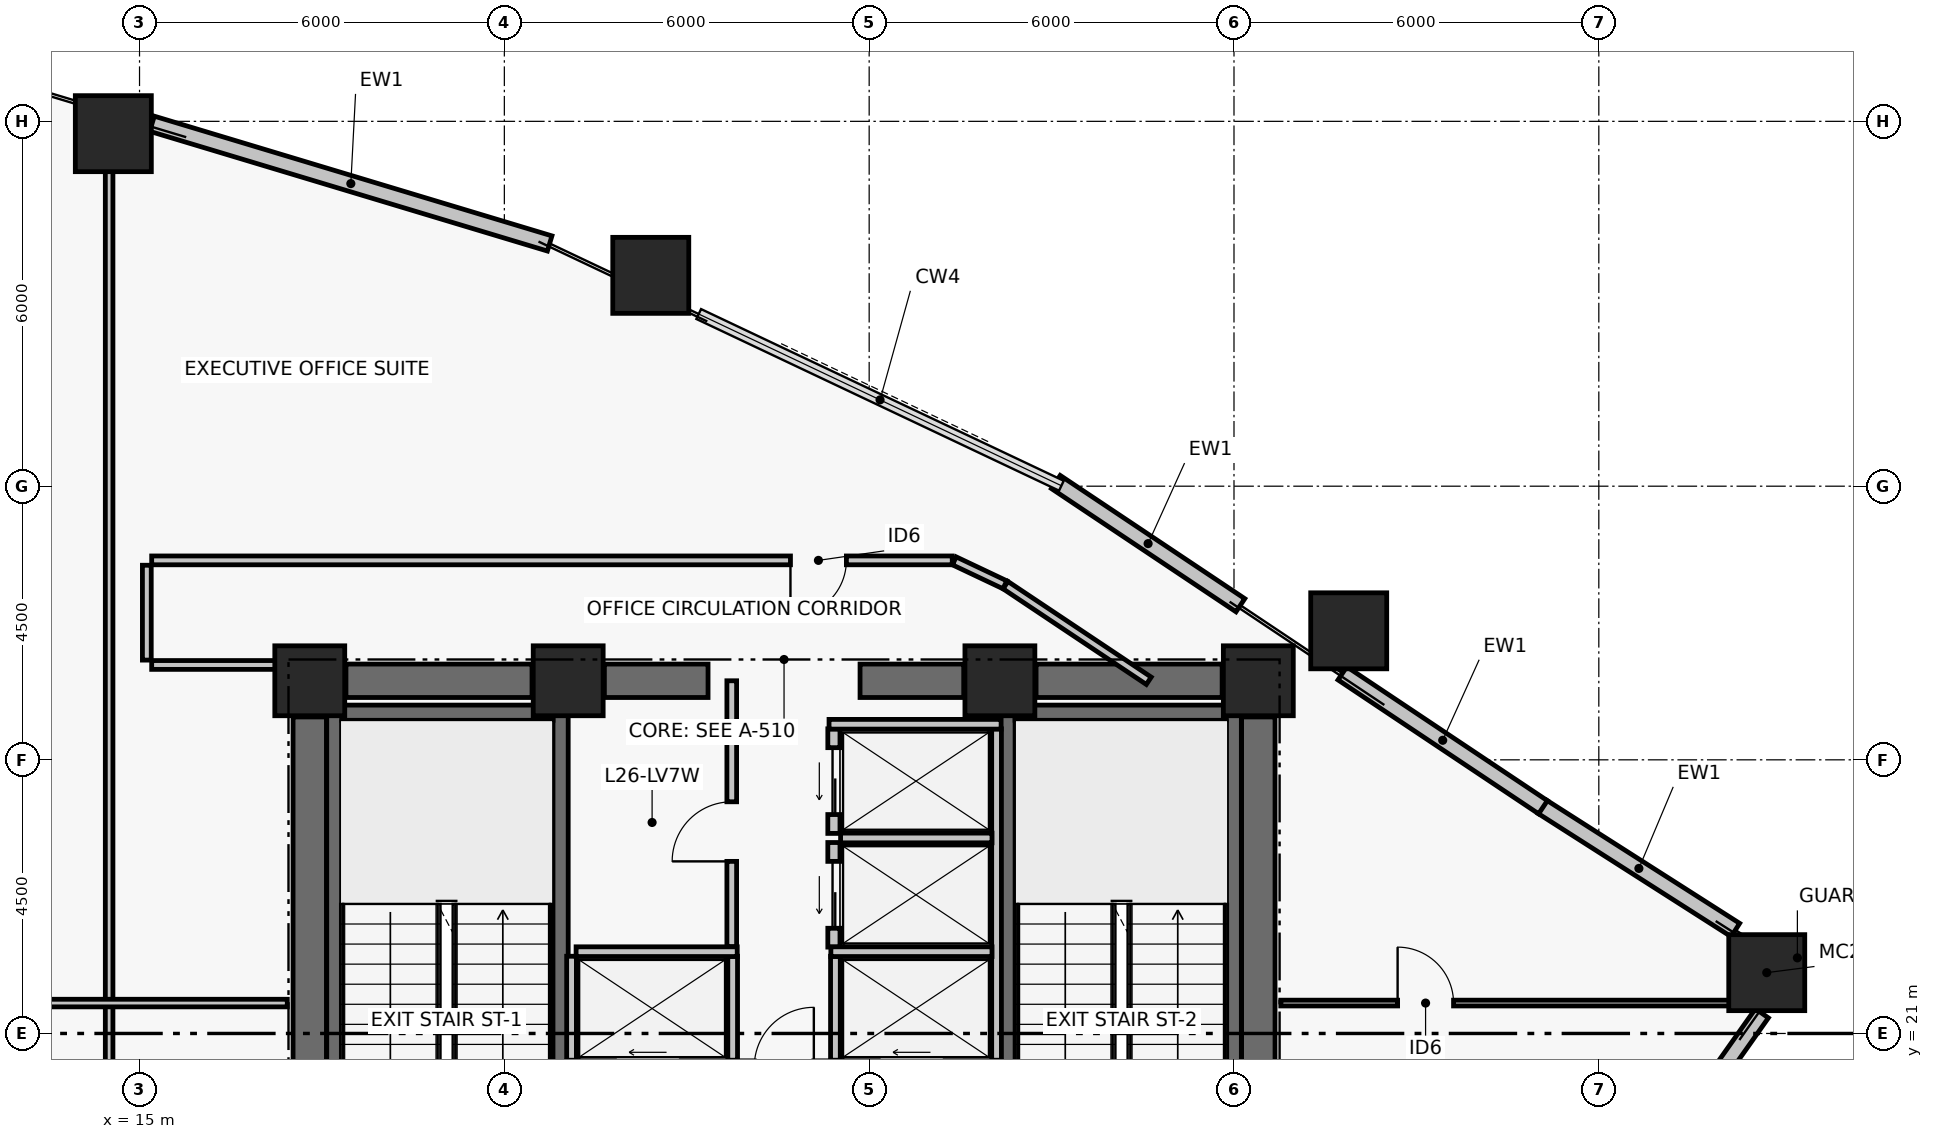
"""IFC4 building model, lengths in metres.
Left out: names, types, materials, properties, quantities, classifications, styles, units other than length and angle.
Written with IfcOpenShell. Run it as: python <this file> out.ifc"""

import sys

from ifc_helpers import new_model, si_unit, direction, frame, frame_2d, origin, origin_2d, place, context, subcontext, project, spatial, rectangle, hollow_rectangle, extrude, element, fill, save


model = new_model("IFC4")
c1 = context("Model", 3, precision=1e-05, world=origin(), true_north=direction((0.0, 1.0)))
c2 = subcontext(c1, "Body", "Model", "MODEL_VIEW")
j1 = project(units=[si_unit("LENGTHUNIT", "METRE"), si_unit("PLANEANGLEUNIT", "RADIAN")], contexts=[c1])
p1 = place(None, origin())
s1 = spatial("IfcSite", under=j1, at=p1, CompositionType="ELEMENT")
p2 = place(p1, origin())
s2 = spatial("IfcBuilding", under=s1, at=p2, CompositionType="ELEMENT")
p3 = place(p2, frame((0.0, 0.0, 107.7)))
s3 = spatial("IfcBuildingStorey", under=s2, at=p3, CompositionType="ELEMENT", Elevation=107.7)
for number, where, z_axis, x_axis in (
    (1, (17.8, 26.8, 0.0), (0.0, 0.0, 1.0), (1.0, 0.0, 0.0)),
    (2, (22.05, 26.8, 0.0), (0.0, 0.0, 1.0), (1.0, 0.0, 0.0)),
    (3, (29.15, 26.8, 0.0), (0.0, 0.0, 1.0), (1.0, 0.0, 0.0)),
    (4, (33.4, 26.8, 0.0), (0.0, 0.0, 1.0), (1.0, 0.0, 0.0)),
):
    element("IfcColumn", number, at=place(p3, frame(where, z_axis=z_axis, x_axis=x_axis)), inside=s3, PredefinedType="COLUMN", context=c2, shape_type="SweptSolid", body=[
        extrude(rectangle(XDim=1.15, YDim=1.15, at=origin_2d()), origin(), (0.0, 0.0, 1.0), 3.72),
    ])
p4 = place(p3, frame((18.395, 26.8, 0.0), z_axis=(0.0, 0.0, 1.0), x_axis=(1.0, 0.0, 0.0)))
e5 = element("IfcWall", 5, at=p4, inside=s3, PredefinedType="SHEAR", context=c2, shape_type="SweptSolid", body=[
    extrude(rectangle(XDim=3.06, YDim=0.55, at=frame_2d((1.53, 0.0))), origin(), (0.0, 0.0, 1.0), 3.47),
])
p5 = place(p3, frame((22.645, 26.8, 0.0), z_axis=(0.0, 0.0, 1.0), x_axis=(1.0, 0.0, 0.0)))
e6 = element("IfcWall", 6, at=p5, inside=s3, PredefinedType="SHEAR", context=c2, shape_type="SweptSolid", body=[
    extrude(rectangle(XDim=1.705, YDim=0.55, at=frame_2d((0.853, 0.0))), origin(), (0.0, 0.0, 1.0), 3.47),
])
p6 = place(p3, frame((26.85, 26.8, 0.0), z_axis=(0.0, 0.0, 1.0), x_axis=(1.0, 0.0, 0.0)))
e7 = element("IfcWall", 7, at=p6, inside=s3, PredefinedType="SHEAR", context=c2, shape_type="SweptSolid", body=[
    extrude(rectangle(XDim=1.705, YDim=0.55, at=frame_2d((0.853, 0.0))), origin(), (0.0, 0.0, 1.0), 3.47),
])
p7 = place(p3, frame((29.745, 26.8, 0.0), z_axis=(0.0, 0.0, 1.0), x_axis=(1.0, 0.0, 0.0)))
e8 = element("IfcWall", 8, at=p7, inside=s3, PredefinedType="SHEAR", context=c2, shape_type="SweptSolid", body=[
    extrude(rectangle(XDim=3.06, YDim=0.55, at=frame_2d((1.53, 0.0))), origin(), (0.0, 0.0, 1.0), 3.47),
])
for number, where, z_axis, x_axis in (
    (9, (17.8, 17.795, 0.0), (0.0, 0.0, 1.0), (0.0, 1.0, 0.0)),
    (10, (33.4, 17.795, 0.0), (0.0, 0.0, 1.0), (0.0, 1.0, 0.0)),
):
    element("IfcWall", number, at=place(p3, frame(where, z_axis=z_axis, x_axis=x_axis)), inside=s3, PredefinedType="SHEAR", context=c2, shape_type="SweptSolid", body=[
        extrude(rectangle(XDim=8.41, YDim=0.55, at=frame_2d((4.205, 0.0))), origin(), (0.0, 0.0, 1.0), 3.47),
    ])
p8 = place(p3, frame((18.204, 17.6, 0.0), z_axis=(0.0, 0.0, 1.0), x_axis=(0.0, 1.0, 0.0)))
e11 = element("IfcWall", 11, at=p8, inside=s3, PredefinedType="SHEAR", context=c2, shape_type="SweptSolid", body=[
    extrude(rectangle(XDim=8.8, YDim=0.25, at=frame_2d((4.4, 0.0))), origin(), (0.0, 0.0, 1.0), 3.47),
])
p9 = place(p3, frame((21.925, 17.6, 0.0), z_axis=(0.0, 0.0, 1.0), x_axis=(0.0, 1.0, 0.0)))
e12 = element("IfcWall", 12, at=p9, inside=s3, PredefinedType="SHEAR", context=c2, shape_type="SweptSolid", body=[
    extrude(rectangle(XDim=8.8, YDim=0.25, at=frame_2d((4.4, 0.0))), origin(), (0.0, 0.0, 1.0), 3.47),
])
p10 = place(p9, frame((0.35, 0.0, 0.0)))
e13 = element("IfcOpeningElement", 13, at=p10, cuts=e12, PredefinedType="OPENING", context=c2, shape_type="SweptSolid", body=[
    extrude(rectangle(XDim=1.05, YDim=2.08, at=frame_2d((0.525, 1.04))), frame((0.0, 0.135, 0.0), z_axis=(0.0, -1.0, 0.0), x_axis=(1.0, 0.0, 0.0)), (0.0, 0.0, 1.0), 0.27),
])
p11 = place(p3, frame((18.329, 26.275, 0.0), z_axis=(0.0, 0.0, 1.0), x_axis=(1.0, 0.0, 0.0)))
e14 = element("IfcWall", 14, at=p11, inside=s3, PredefinedType="SHEAR", context=c2, shape_type="SweptSolid", body=[
    extrude(rectangle(XDim=3.471, YDim=0.25, at=frame_2d((1.735, 0.0))), origin(), (0.0, 0.0, 1.0), 3.47),
])
p12 = place(p3, frame((29.275, 17.6, 0.0), z_axis=(0.0, 0.0, 1.0), x_axis=(0.0, 1.0, 0.0)))
e15 = element("IfcWall", 15, at=p12, inside=s3, PredefinedType="SHEAR", context=c2, shape_type="SweptSolid", body=[
    extrude(rectangle(XDim=8.8, YDim=0.25, at=frame_2d((4.4, 0.0))), origin(), (0.0, 0.0, 1.0), 3.47),
])
p13 = place(p12, frame((0.35, 0.0, 0.0)))
e16 = element("IfcOpeningElement", 16, at=p13, cuts=e15, PredefinedType="OPENING", context=c2, shape_type="SweptSolid", body=[
    extrude(rectangle(XDim=1.05, YDim=2.08, at=frame_2d((0.525, 1.04))), frame((0.0, 0.135, 0.0), z_axis=(0.0, -1.0, 0.0), x_axis=(1.0, 0.0, 0.0)), (0.0, 0.0, 1.0), 0.27),
])
p14 = place(p3, frame((32.996, 17.6, 0.0), z_axis=(0.0, 0.0, 1.0), x_axis=(0.0, 1.0, 0.0)))
e17 = element("IfcWall", 17, at=p14, inside=s3, PredefinedType="SHEAR", context=c2, shape_type="SweptSolid", body=[
    extrude(rectangle(XDim=8.8, YDim=0.25, at=frame_2d((4.4, 0.0))), origin(), (0.0, 0.0, 1.0), 3.47),
])
p15 = place(p3, frame((29.4, 26.275, 0.0), z_axis=(0.0, 0.0, 1.0), x_axis=(1.0, 0.0, 0.0)))
e18 = element("IfcWall", 18, at=p15, inside=s3, PredefinedType="SHEAR", context=c2, shape_type="SweptSolid", body=[
    extrude(rectangle(XDim=3.471, YDim=0.25, at=frame_2d((1.736, 0.0))), origin(), (0.0, 0.0, 1.0), 3.47),
])
for number, where, z_axis, x_axis in (
    (19, (41.762, 22.0, 0.0), (0.0, 0.0, 1.0), (1.0, 0.0, 0.0)),
    (20, (34.887, 27.622, 0.0), (0.0, 0.0, 1.0), (1.0, 0.0, 0.0)),
    (21, (23.408, 33.467, 0.0), (0.0, 0.0, 1.0), (1.0, 0.0, 0.0)),
    (22, (14.569, 35.797, 0.0), (0.0, 0.0, 1.0), (1.0, 0.0, 0.0)),
):
    element("IfcColumn", number, at=place(p3, frame(where, z_axis=z_axis, x_axis=x_axis)), inside=s3, PredefinedType="COLUMN", context=c2, shape_type="SweptSolid", body=[
        extrude(hollow_rectangle(XDim=1.25, YDim=1.25, WallThickness=0.05, at=origin_2d()), origin(), (0.0, 0.0, 1.0), 3.72),
    ])
p16 = place(p3, frame((41.682, 21.331, 0.0), z_axis=(0.0, 0.0, 1.0), x_axis=(-0.577134204686, -0.816649318729, 0.0)))
e23 = element("IfcWall", 23, at=p16, inside=s3, PredefinedType="PARTITIONING", context=c2, shape_type="SweptSolid", body=[
    extrude(rectangle(XDim=2.21, YDim=0.26, at=frame_2d((1.105, 0.0))), origin(), (0.0, 0.0, 1.0), 3.47),
])
p17 = place(p3, frame((38.072, 24.727, 0.0), z_axis=(0.0, 0.0, 1.0), x_axis=(0.843033549628, -0.537860980367, 0.0)))
e24 = element("IfcWall", 24, at=p17, inside=s3, PredefinedType="PARTITIONING", context=c2, shape_type="SweptSolid", body=[
    extrude(rectangle(XDim=3.766, YDim=0.26, at=frame_2d((1.883, 0.0))), origin(), (0.0, 0.0, 1.0), 2.9),
])
p18 = place(p3, frame((34.783, 26.922, 0.0), z_axis=(0.0, 0.0, 1.0), x_axis=(0.831718676225, -0.555197301523, 0.0)))
e25 = element("IfcWall", 25, at=p18, inside=s3, PredefinedType="PARTITIONING", context=c2, shape_type="SweptSolid", body=[
    extrude(rectangle(XDim=3.966, YDim=0.26, at=frame_2d((1.983, 0.0))), origin(), (0.0, 0.0, 1.0), 2.77),
])
p19 = place(p3, frame((30.07, 30.069, 0.0), z_axis=(0.0, 0.0, 1.0), x_axis=(0.831720838908, -0.555194061681, 0.0)))
e26 = element("IfcWall", 26, at=p19, inside=s3, PredefinedType="PARTITIONING", context=c2, shape_type="SweptSolid", body=[
    extrude(rectangle(XDim=3.65, YDim=0.26, at=frame_2d((1.825, 0.0))), origin(), (0.0, 0.0, 1.0), 2.9),
])
p20 = place(p3, frame((15.205, 35.961, 0.0), z_axis=(0.0, 0.0, 1.0), x_axis=(0.957547425539, -0.288275784351, 0.0)))
e27 = element("IfcWall", 27, at=p20, inside=s3, PredefinedType="PARTITIONING", context=c2, shape_type="SweptSolid", body=[
    extrude(rectangle(XDim=6.83, YDim=0.26, at=frame_2d((3.415, 0.0))), origin(), (0.0, 0.0, 1.0), 2.9),
])
p21 = place(p3, frame((26.42, 22.42, 0.0), z_axis=(0.0, 0.0, 1.0), x_axis=(0.0, 1.0, 0.0)))
e28 = element("IfcWall", 28, at=p21, inside=s3, PredefinedType="PARTITIONING", context=c2, shape_type="SweptSolid", body=[
    extrude(rectangle(XDim=1.72, YDim=0.2, at=frame_2d((0.86, 0.0))), origin(), (0.0, 0.0, 1.0), 3.47),
])
p22 = place(p21, frame((0.31, 0.0, 0.0)))
e29 = element("IfcOpeningElement", 29, at=p22, cuts=e28, PredefinedType="OPENING", context=c2, shape_type="SweptSolid", body=[
    extrude(rectangle(XDim=1.1, YDim=2.08, at=frame_2d((0.55, 1.04))), frame((0.0, 0.11, 0.0), z_axis=(0.0, -1.0, 0.0), x_axis=(1.0, 0.0, 0.0)), (0.0, 0.0, 1.0), 0.22),
])
p23 = place(p3, frame((26.42, 24.29, 0.0), z_axis=(0.0, 0.0, 1.0), x_axis=(0.0, 1.0, 0.0)))
e30 = element("IfcWall", 30, at=p23, inside=s3, PredefinedType="PARTITIONING", context=c2, shape_type="SweptSolid", body=[
    extrude(rectangle(XDim=1.72, YDim=0.2, at=frame_2d((0.86, 0.0))), origin(), (0.0, 0.0, 1.0), 3.47),
])
p24 = place(p23, frame((0.31, 0.0, 0.0)))
e31 = element("IfcOpeningElement", 31, at=p24, cuts=e30, PredefinedType="OPENING", context=c2, shape_type="SweptSolid", body=[
    extrude(rectangle(XDim=1.1, YDim=2.08, at=frame_2d((0.55, 1.04))), frame((0.0, 0.11, 0.0), z_axis=(0.0, -1.0, 0.0), x_axis=(1.0, 0.0, 0.0)), (0.0, 0.0, 1.0), 0.22),
])
for number, where, z_axis, x_axis in (
    (32, (22.105, 20.56, 0.0), (0.0, 0.0, 1.0), (0.0, 1.0, 0.0)),
    (33, (24.755, 20.56, 0.0), (0.0, 0.0, 1.0), (0.0, 1.0, 0.0)),
):
    element("IfcWall", number, at=place(p3, frame(where, z_axis=z_axis, x_axis=x_axis)), inside=s3, PredefinedType="PARTITIONING", context=c2, shape_type="SweptSolid", body=[
        extrude(rectangle(XDim=1.71, YDim=0.16, at=frame_2d((0.855, 0.0))), origin(), (0.0, 0.0, 1.0), 3.47),
    ])
p25 = place(p3, frame((22.18, 22.345, 0.0), z_axis=(0.0, 0.0, 1.0), x_axis=(1.0, 0.0, 0.0)))
e34 = element("IfcWall", 34, at=p25, inside=s3, PredefinedType="PARTITIONING", context=c2, shape_type="SweptSolid", body=[
    extrude(rectangle(XDim=2.65, YDim=0.16, at=frame_2d((1.325, 0.0))), origin(), (0.0, 0.0, 1.0), 3.47),
])
p26 = place(p3, frame((29.095, 20.56, 0.0), z_axis=(0.0, 0.0, 1.0), x_axis=(0.0, 1.0, 0.0)))
e35 = element("IfcWall", 35, at=p26, inside=s3, PredefinedType="PARTITIONING", context=c2, shape_type="SweptSolid", body=[
    extrude(rectangle(XDim=5.45, YDim=0.16, at=frame_2d((2.725, 0.0))), origin(), (0.0, 0.0, 1.0), 3.47),
])
p27 = place(p3, frame((26.445, 20.56, 0.0), z_axis=(0.0, 0.0, 1.0), x_axis=(0.0, 1.0, 0.0)))
e36 = element("IfcWall", 36, at=p27, inside=s3, PredefinedType="PARTITIONING", context=c2, shape_type="SweptSolid", body=[
    extrude(rectangle(XDim=1.71, YDim=0.16, at=frame_2d((0.855, 0.0))), origin(), (0.0, 0.0, 1.0), 3.47),
])
p28 = place(p3, frame((26.37, 22.345, 0.0), z_axis=(0.0, 0.0, 1.0), x_axis=(1.0, 0.0, 0.0)))
e37 = element("IfcWall", 37, at=p28, inside=s3, PredefinedType="PARTITIONING", context=c2, shape_type="SweptSolid", body=[
    extrude(rectangle(XDim=2.65, YDim=0.16, at=frame_2d((1.325, 0.0))), origin(), (0.0, 0.0, 1.0), 3.47),
])
p29 = place(p3, frame((26.53, 24.215, 0.0), z_axis=(0.0, 0.0, 1.0), x_axis=(1.0, 0.0, 0.0)))
e38 = element("IfcWall", 38, at=p29, inside=s3, PredefinedType="PARTITIONING", context=c2, shape_type="SweptSolid", body=[
    extrude(rectangle(XDim=2.49, YDim=0.16, at=frame_2d((1.245, 0.0))), origin(), (0.0, 0.0, 1.0), 3.47),
])
p30 = place(p3, frame((26.34, 26.085, 0.0), z_axis=(0.0, 0.0, 1.0), x_axis=(1.0, 0.0, 0.0)))
e39 = element("IfcWall", 39, at=p30, inside=s3, PredefinedType="PARTITIONING", context=c2, shape_type="SweptSolid", body=[
    extrude(rectangle(XDim=2.83, YDim=0.16, at=frame_2d((1.415, 0.0))), origin(), (0.0, 0.0, 1.0), 3.47),
])
p31 = place(p3, frame((24.74, 22.43, 0.0), z_axis=(0.0, 0.0, 1.0), x_axis=(0.0, 1.0, 0.0)))
e40 = element("IfcWall", 40, at=p31, inside=s3, PredefinedType="PARTITIONING", context=c2, shape_type="SweptSolid", body=[
    extrude(rectangle(XDim=4.37, YDim=0.16, at=frame_2d((2.185, 0.0))), origin(), (0.0, 0.0, 1.0), 2.6),
])
p32 = place(p31, frame((1.4, 0.0, 0.0)))
e41 = element("IfcOpeningElement", 41, at=p32, cuts=e40, PredefinedType="OPENING", context=c2, shape_type="SweptSolid", body=[
    extrude(rectangle(XDim=0.98, YDim=2.06, at=frame_2d((0.49, 1.03))), frame((0.0, 0.09, 0.0), z_axis=(0.0, -1.0, 0.0), x_axis=(1.0, 0.0, 0.0)), (0.0, 0.0, 1.0), 0.18),
])
p33 = place(p3, frame((31.598, 26.8, 0.0), z_axis=(0.0, 0.0, 1.0), x_axis=(-0.831758510993, 0.555137622028, 0.0)))
e42 = element("IfcWall", 42, at=p33, inside=s3, PredefinedType="PARTITIONING", context=c2, shape_type="SweptSolid", body=[
    extrude(rectangle(XDim=2.833, YDim=0.145, at=frame_2d((1.417, 0.0))), origin(), (0.0, 0.0, 1.0), 2.6),
])
p34 = place(p3, frame((29.232, 28.379, 0.0), z_axis=(0.0, 0.0, 1.0), x_axis=(-0.903829701814, 0.427892358098, 0.0)))
e43 = element("IfcWall", 43, at=p34, inside=s3, PredefinedType="PARTITIONING", context=c2, shape_type="SweptSolid", body=[
    extrude(rectangle(XDim=0.92, YDim=0.145, at=frame_2d((0.46, 0.0))), origin(), (0.0, 0.0, 1.0), 3.47),
])
p35 = place(p3, frame((28.366, 28.78, 0.0), z_axis=(0.0, 0.0, 1.0), x_axis=(-1.0, 0.0, 0.0)))
e44 = element("IfcWall", 44, at=p35, inside=s3, PredefinedType="PARTITIONING", context=c2, shape_type="SweptSolid", body=[
    extrude(rectangle(XDim=13.166, YDim=0.145, at=frame_2d((6.583, 0.0))), origin(), (0.0, 0.0, 1.0), 2.65),
])
p36 = place(p35, frame((1.741, 0.0, 0.0)))
e45 = element("IfcOpeningElement", 45, at=p36, cuts=e44, PredefinedType="OPENING", context=c2, shape_type="SweptSolid", body=[
    extrude(rectangle(XDim=0.92, YDim=2.05, at=frame_2d((0.46, 1.025))), frame((0.0, 0.083, 0.0), z_axis=(0.0, -1.0, 0.0), x_axis=(1.0, 0.0, 0.0)), (0.0, 0.0, 1.0), 0.165),
])
p37 = place(p3, frame((15.12, 28.7, 0.0), z_axis=(0.0, 0.0, 1.0), x_axis=(0.0, -1.0, 0.0)))
e46 = element("IfcWall", 46, at=p37, inside=s3, PredefinedType="PARTITIONING", context=c2, shape_type="SweptSolid", body=[
    extrude(rectangle(XDim=1.56, YDim=0.145, at=frame_2d((0.78, 0.0))), origin(), (0.0, 0.0, 1.0), 2.65),
])
p38 = place(p3, frame((15.2, 27.06, 0.0), z_axis=(0.0, 0.0, 1.0), x_axis=(1.0, 0.0, 0.0)))
e47 = element("IfcWall", 47, at=p38, inside=s3, PredefinedType="PARTITIONING", context=c2, shape_type="SweptSolid", body=[
    extrude(rectangle(XDim=2.18, YDim=0.145, at=frame_2d((1.09, 0.0))), origin(), (0.0, 0.0, 1.0), 2.65),
])
p39 = place(p3, frame((14.5, 7.535, 0.0), z_axis=(0.0, 0.0, 1.0), x_axis=(0.0, 1.0, 0.0)))
e48 = element("IfcWall", 48, at=p39, inside=s3, PredefinedType="PARTITIONING", context=c2, shape_type="SweptSolid", body=[
    extrude(rectangle(XDim=28.648, YDim=0.125, at=frame_2d((14.324, 0.0))), origin(), (0.0, 0.0, 1.0), 2.2),
])
p40 = place(p39, frame((11.325, 0.0, 0.0)))
e49 = element("IfcOpeningElement", 49, at=p40, cuts=e48, PredefinedType="OPENING", context=c2, shape_type="SweptSolid", body=[
    extrude(rectangle(XDim=0.92, YDim=2.05, at=frame_2d((0.46, 1.025))), frame((0.0, 0.073, 0.0), z_axis=(0.0, -1.0, 0.0), x_axis=(1.0, 0.0, 0.0)), (0.0, 0.0, 1.0), 0.145),
])
p41 = place(p3, frame((3.128, 21.5, 0.0), z_axis=(0.0, 0.0, 1.0), x_axis=(1.0, 0.0, 0.0)))
e50 = element("IfcWall", 50, at=p41, inside=s3, PredefinedType="PARTITIONING", context=c2, shape_type="SweptSolid", body=[
    extrude(rectangle(XDim=14.302, YDim=0.125, at=frame_2d((7.151, 0.0))), origin(), (0.0, 0.0, 1.0), 2.6),
])
p42 = place(p41, frame((0.28, 0.0, 0.0)))
e51 = element("IfcOpeningElement", 51, at=p42, cuts=e50, PredefinedType="OPENING", context=c2, shape_type="SweptSolid", body=[
    extrude(rectangle(XDim=0.92, YDim=2.05, at=frame_2d((0.46, 1.025))), frame((0.0, 0.073, 0.0), z_axis=(0.0, -1.0, 0.0), x_axis=(1.0, 0.0, 0.0)), (0.0, 0.0, 1.0), 0.145),
])
p43 = place(p3, frame((33.77, 21.5, 0.0), z_axis=(0.0, 0.0, 1.0), x_axis=(1.0, 0.0, 0.0)))
e52 = element("IfcWall", 52, at=p43, inside=s3, PredefinedType="PARTITIONING", context=c2, shape_type="SweptSolid", body=[
    extrude(rectangle(XDim=8.044, YDim=0.095, at=frame_2d((4.022, 0.0))), origin(), (0.0, 0.0, 1.0), 2.6),
])
p44 = place(p43, frame((1.921, 0.0, 0.0)))
e53 = element("IfcOpeningElement", 53, at=p44, cuts=e52, PredefinedType="OPENING", context=c2, shape_type="SweptSolid", body=[
    extrude(rectangle(XDim=0.92, YDim=2.05, at=frame_2d((0.46, 1.025))), frame((0.0, 0.057, 0.0), z_axis=(0.0, -1.0, 0.0), x_axis=(1.0, 0.0, 0.0)), (0.0, 0.0, 1.0), 0.115),
])
p45 = place(p22, origin())
e54 = element("IfcDoor", 54, at=p45, inside=s3, OperationType="DOUBLE_DOOR_SLIDING", PredefinedType="DOOR", context=c2, shape_type="SweptSolid", body=[
    extrude(rectangle(XDim=1.1, YDim=2.08, at=frame_2d((0.55, 1.04))), frame((0.0, 0.025, 0.0), z_axis=(0.0, -1.0, 0.0), x_axis=(1.0, 0.0, 0.0)), (0.0, 0.0, 1.0), 0.05),
])
fill(e29, e54)
p46 = place(p24, origin())
e55 = element("IfcDoor", 55, at=p46, inside=s3, OperationType="DOUBLE_DOOR_SLIDING", PredefinedType="DOOR", context=c2, shape_type="SweptSolid", body=[
    extrude(rectangle(XDim=1.1, YDim=2.08, at=frame_2d((0.55, 1.04))), frame((0.0, 0.025, 0.0), z_axis=(0.0, -1.0, 0.0), x_axis=(1.0, 0.0, 0.0)), (0.0, 0.0, 1.0), 0.05),
])
fill(e31, e55)
p47 = place(p32, origin())
e56 = element("IfcDoor", 56, at=p47, inside=s3, OperationType="SINGLE_SWING_LEFT", PredefinedType="DOOR", context=c2, shape_type="SweptSolid", body=[
    extrude(rectangle(XDim=0.98, YDim=2.06, at=frame_2d((0.49, 1.03))), frame((0.0, 0.025, 0.0), z_axis=(0.0, -1.0, 0.0), x_axis=(1.0, 0.0, 0.0)), (0.0, 0.0, 1.0), 0.05),
])
fill(e41, e56)
p48 = place(p36, origin())
e57 = element("IfcDoor", 57, at=p48, inside=s3, OperationType="SINGLE_SWING_RIGHT", PredefinedType="DOOR", context=c2, shape_type="SweptSolid", body=[
    extrude(rectangle(XDim=0.92, YDim=2.05, at=frame_2d((0.46, 1.025))), frame((0.0, 0.025, 0.0), z_axis=(0.0, -1.0, 0.0), x_axis=(1.0, 0.0, 0.0)), (0.0, 0.0, 1.0), 0.05),
])
fill(e45, e57)
p49 = place(p44, origin())
e58 = element("IfcDoor", 58, at=p49, inside=s3, OperationType="SINGLE_SWING_LEFT", PredefinedType="DOOR", context=c2, shape_type="SweptSolid", body=[
    extrude(rectangle(XDim=0.92, YDim=2.05, at=frame_2d((0.46, 1.025))), frame((0.0, 0.025, 0.0), z_axis=(0.0, -1.0, 0.0), x_axis=(1.0, 0.0, 0.0)), (0.0, 0.0, 1.0), 0.05),
])
fill(e53, e58)
save(model, sys.argv[1])
